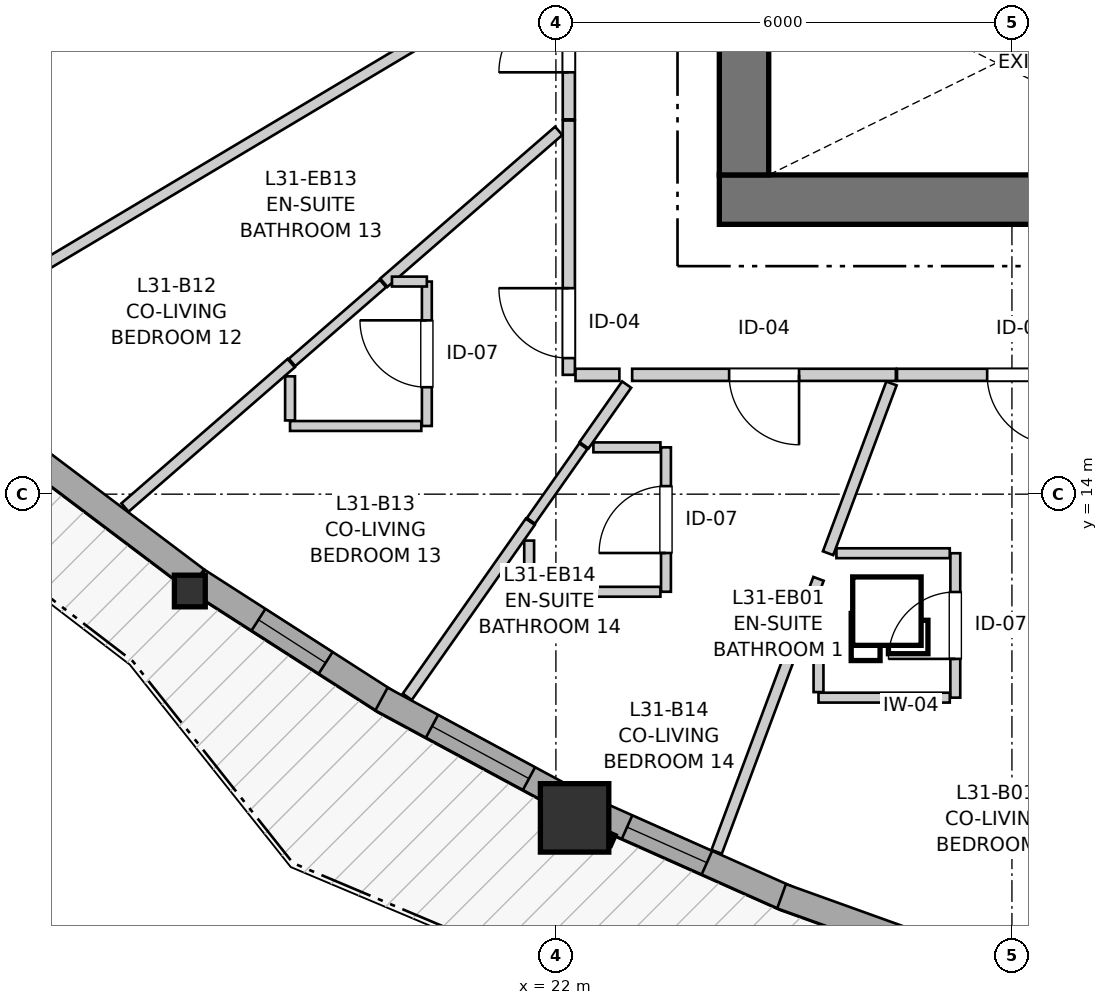
"""IFC4 building model, lengths in metres.
Left out: names, types, materials, properties, quantities, classifications, styles, units other than length and angle.
Written with IfcOpenShell. Run it as: python <this file> out.ifc"""

import sys

from ifc_helpers import new_model, si_unit, direction, frame, frame_2d, origin, origin_2d, place, context, subcontext, project, spatial, rectangle, i_section, extrude, source, transform, mapped, element, fill, save


model = new_model("IFC4")
c1 = context("Model", 3, precision=1e-05, world=origin(), true_north=direction((0.0, 1.0)))
c2 = subcontext(c1, "Body", "Model", "MODEL_VIEW")
j1 = project(units=[si_unit("LENGTHUNIT", "METRE"), si_unit("PLANEANGLEUNIT", "RADIAN")], contexts=[c1])
p1 = place(None, origin())
s1 = spatial("IfcSite", under=j1, at=p1, CompositionType="ELEMENT")
p2 = place(p1, origin())
s2 = spatial("IfcBuilding", under=s1, at=p2, CompositionType="ELEMENT")
p3 = place(p2, frame((0.0, 0.0, 105.6)))
s3 = spatial("IfcBuildingStorey", under=s2, at=p3, CompositionType="ELEMENT", Elevation=105.6)
p4 = place(p3, frame((24.15, 17.875, 0.0), z_axis=(0.0, 0.0, 1.0), x_axis=(1.0, 0.0, 0.0)))
e1 = element("IfcWall", 1, at=p4, inside=s3, PredefinedType="SHEAR", context=c2, shape_type="SweptSolid", body=[
    extrude(rectangle(XDim=12.4, YDim=0.65, at=frame_2d((6.2, 0.0))), origin(), (0.0, 0.0, 1.0), 2.935),
])
p5 = place(p3, frame((24.475, 33.8, 0.0), z_axis=(0.0, 0.0, 1.0), x_axis=(0.0, -1.0, 0.0)))
e2 = element("IfcWall", 2, at=p5, inside=s3, PredefinedType="SHEAR", context=c2, shape_type="SweptSolid", body=[
    extrude(rectangle(XDim=15.6, YDim=0.65, at=frame_2d((7.8, 0.0))), origin(), (0.0, 0.0, 1.0), 2.935),
])
p6 = place(p5, frame((7.05, 0.0, 0.0)))
e3 = element("IfcOpeningElement", 3, at=p6, cuts=e2, PredefinedType="OPENING", context=c2, shape_type="SweptSolid", body=[
    extrude(rectangle(XDim=1.5, YDim=2.15, at=frame_2d((0.75, 1.075))), frame((0.0, 0.335, 0.0), z_axis=(0.0, -1.0, 0.0), x_axis=(1.0, 0.0, 0.0)), (0.0, 0.0, 1.0), 0.67),
])
p7 = place(p5, frame((3.52, 0.0, 0.0)))
e4 = element("IfcOpeningElement", 4, at=p7, cuts=e2, PredefinedType="OPENING", context=c2, shape_type="SweptSolid", body=[
    extrude(rectangle(XDim=0.86, YDim=2.05, at=frame_2d((0.43, 1.025))), frame((0.0, 0.335, 0.0), z_axis=(0.0, -1.0, 0.0), x_axis=(1.0, 0.0, 0.0)), (0.0, 0.0, 1.0), 0.67),
])
p8 = place(p5, frame((11.22, 0.0, 0.0)))
e5 = element("IfcOpeningElement", 5, at=p8, cuts=e2, PredefinedType="OPENING", context=c2, shape_type="SweptSolid", body=[
    extrude(rectangle(XDim=0.86, YDim=2.05, at=frame_2d((0.43, 1.025))), frame((0.0, 0.335, 0.0), z_axis=(0.0, -1.0, 0.0), x_axis=(1.0, 0.0, 0.0)), (0.0, 0.0, 1.0), 0.67),
])
m1 = source(origin(), c2, "Body", "SweptSolid", [
    extrude(i_section(OverallWidth=0.406, OverallDepth=0.416, WebThickness=0.027, FlangeThickness=0.044, FilletRadius=0.015, at=origin_2d()), origin(), (0.0, 0.0, 1.0), 2.935),
])
p9 = place(p3, frame((17.184, 12.726, 0.0), z_axis=(0.0, 0.0, 1.0), x_axis=(1.0, 0.0, 0.0)))
e6 = element("IfcColumn", 6, at=p9, inside=s3, PredefinedType="PILASTER", context=c2, shape_type="MappedRepresentation", body=[
    mapped(m1, transform((0.0, 0.0, 0.0), x_axis=(1.0, 0.0, 0.0), y_axis=(0.0, 1.0, 0.0), z_axis=(0.0, 0.0, 1.0), scale=1.0)),
])
m2 = source(origin(), c2, "Body", "SweptSolid", [
    extrude(rectangle(XDim=0.9, YDim=0.9, at=origin_2d()), origin(), (0.0, 0.0, 1.0), 2.935),
])
p10 = place(p3, frame((22.246, 9.741, 0.0), z_axis=(0.0, 0.0, 1.0), x_axis=(1.0, 0.0, 0.0)))
e7 = element("IfcColumn", 7, at=p10, inside=s3, PredefinedType="COLUMN", context=c2, shape_type="MappedRepresentation", body=[
    mapped(m2, transform((0.0, 0.0, 0.0), x_axis=(1.0, 0.0, 0.0), y_axis=(0.0, 1.0, 0.0), z_axis=(0.0, 0.0, 1.0), scale=1.0)),
])
p11 = place(p3, frame((14.894, 14.665, 0.0), z_axis=(0.0, 0.0, 1.0), x_axis=(0.798431756537, -0.602085318001, 0.0)))
e8 = element("IfcWall", 8, at=p11, inside=s3, PredefinedType="SOLIDWALL", context=c2, shape_type="SweptSolid", body=[
    extrude(rectangle(XDim=2.976, YDim=0.34, at=frame_2d((1.488, 0.0))), origin(), (0.0, 0.0, 1.0), 2.465),
])
p12 = place(p3, frame((17.292, 12.858, 0.0), z_axis=(0.0, 0.0, 1.0), x_axis=(0.841524200167, -0.540219418878, 0.0)))
e9 = element("IfcWall", 9, at=p12, inside=s3, PredefinedType="SOLIDWALL", context=c2, shape_type="SweptSolid", body=[
    extrude(rectangle(XDim=2.958, YDim=0.34, at=frame_2d((1.479, 0.0))), origin(), (0.0, 0.0, 1.0), 2.465),
])
p13 = place(p12, frame((0.944, 0.0, 0.82)))
e10 = element("IfcOpeningElement", 10, at=p13, cuts=e9, PredefinedType="OPENING", context=c2, shape_type="SweptSolid", body=[
    extrude(rectangle(XDim=1.05, YDim=1.45, at=frame_2d((0.525, 0.725))), frame((0.0, 0.18, 0.0), z_axis=(0.0, -1.0, 0.0), x_axis=(1.0, 0.0, 0.0)), (0.0, 0.0, 1.0), 0.36),
])
p14 = place(p3, frame((19.705, 11.305, 0.0), z_axis=(0.0, 0.0, 1.0), x_axis=(0.880065774925, -0.474851799834, 0.0)))
e11 = element("IfcWall", 11, at=p14, inside=s3, PredefinedType="SOLIDWALL", context=c2, shape_type="SweptSolid", body=[
    extrude(rectangle(XDim=2.749, YDim=0.34, at=frame_2d((1.374, 0.0))), origin(), (0.0, 0.0, 1.0), 2.465),
])
p15 = place(p14, frame((0.755, 0.0, 0.82)))
e12 = element("IfcOpeningElement", 12, at=p15, cuts=e11, PredefinedType="OPENING", context=c2, shape_type="SweptSolid", body=[
    extrude(rectangle(XDim=1.45, YDim=1.25, at=frame_2d((0.725, 0.625))), frame((0.0, 0.18, 0.0), z_axis=(0.0, -1.0, 0.0), x_axis=(1.0, 0.0, 0.0)), (0.0, 0.0, 1.0), 0.36),
])
p16 = place(p3, frame((22.525, 9.803, 0.0), z_axis=(0.0, 0.0, 1.0), x_axis=(0.913407022137, -0.407047432016, 0.0)))
e13 = element("IfcWall", 13, at=p16, inside=s3, PredefinedType="SOLIDWALL", context=c2, shape_type="SweptSolid", body=[
    extrude(rectangle(XDim=2.766, YDim=0.34, at=frame_2d((1.383, 0.0))), origin(), (0.0, 0.0, 1.0), 2.465),
])
p17 = place(p16, frame((0.45, 0.0, 0.82)))
e14 = element("IfcOpeningElement", 14, at=p17, cuts=e13, PredefinedType="OPENING", context=c2, shape_type="SweptSolid", body=[
    extrude(rectangle(XDim=1.15, YDim=1.2, at=frame_2d((0.575, 0.6))), frame((0.0, 0.18, 0.0), z_axis=(0.0, -1.0, 0.0), x_axis=(1.0, 0.0, 0.0)), (0.0, 0.0, 1.0), 0.36),
])
p18 = place(p3, frame((24.969, 8.71, 0.0), z_axis=(0.0, 0.0, 1.0), x_axis=(0.94111062187, -0.338098798287, 0.0)))
e15 = element("IfcWall", 15, at=p18, inside=s3, PredefinedType="SOLIDWALL", context=c2, shape_type="SweptSolid", body=[
    extrude(rectangle(XDim=3.009, YDim=0.34, at=frame_2d((1.504, 0.0))), origin(), (0.0, 0.0, 1.0), 2.465),
])
p19 = place(p3, frame((26.473, 15.57, 0.0), z_axis=(0.0, 0.0, 1.0), x_axis=(-1.0, 0.0, 0.0)))
e16 = element("IfcWall", 16, at=p19, inside=s3, PredefinedType="PARTITIONING", context=c2, shape_type="SweptSolid", body=[
    extrude(rectangle(XDim=3.47, YDim=0.16, at=frame_2d((1.735, 0.0))), origin(), (0.0, 0.0, 1.0), 2.935),
])
p20 = place(p19, frame((1.274, 0.0, 0.0)))
e17 = element("IfcOpeningElement", 17, at=p20, cuts=e16, PredefinedType="OPENING", context=c2, shape_type="SweptSolid", body=[
    extrude(rectangle(XDim=0.92, YDim=2.1, at=frame_2d((0.46, 1.05))), frame((0.0, 0.09, 0.0), z_axis=(0.0, -1.0, 0.0), x_axis=(1.0, 0.0, 0.0)), (0.0, 0.0, 1.0), 0.18),
])
p21 = place(p3, frame((22.17, 15.57, 0.0), z_axis=(0.0, 0.0, 1.0), x_axis=(0.0, 1.0, 0.0)))
e18 = element("IfcWall", 18, at=p21, inside=s3, PredefinedType="PARTITIONING", context=c2, shape_type="SweptSolid", body=[
    extrude(rectangle(XDim=3.346, YDim=0.16, at=frame_2d((1.673, 0.0))), origin(), (0.0, 0.0, 1.0), 2.935),
])
p22 = place(p21, frame((0.22, 0.0, 0.0)))
e19 = element("IfcOpeningElement", 19, at=p22, cuts=e18, PredefinedType="OPENING", context=c2, shape_type="SweptSolid", body=[
    extrude(rectangle(XDim=0.92, YDim=2.1, at=frame_2d((0.46, 1.05))), frame((0.0, 0.09, 0.0), z_axis=(0.0, -1.0, 0.0), x_axis=(1.0, 0.0, 0.0)), (0.0, 0.0, 1.0), 0.18),
])
p23 = place(p3, frame((29.781, 15.57, 0.0), z_axis=(0.0, 0.0, 1.0), x_axis=(-1.0, 0.0, 0.0)))
e20 = element("IfcWall", 20, at=p23, inside=s3, PredefinedType="PARTITIONING", context=c2, shape_type="SweptSolid", body=[
    extrude(rectangle(XDim=3.293, YDim=0.16, at=frame_2d((1.646, 0.0))), origin(), (0.0, 0.0, 1.0), 2.935),
])
p24 = place(p23, frame((1.187, 0.0, 0.0)))
e21 = element("IfcOpeningElement", 21, at=p24, cuts=e20, PredefinedType="OPENING", context=c2, shape_type="SweptSolid", body=[
    extrude(rectangle(XDim=0.92, YDim=2.1, at=frame_2d((0.46, 1.05))), frame((0.0, 0.09, 0.0), z_axis=(0.0, -1.0, 0.0), x_axis=(1.0, 0.0, 0.0)), (0.0, 0.0, 1.0), 0.18),
])
p25 = place(p3, frame((22.17, 18.931, 0.0), z_axis=(0.0, 0.0, 1.0), x_axis=(0.0, 1.0, 0.0)))
e22 = element("IfcWall", 22, at=p25, inside=s3, PredefinedType="PARTITIONING", context=c2, shape_type="SweptSolid", body=[
    extrude(rectangle(XDim=2.21, YDim=0.16, at=frame_2d((1.105, 0.0))), origin(), (0.0, 0.0, 1.0), 2.935),
])
p26 = place(p25, frame((0.619, 0.0, 0.0)))
e23 = element("IfcOpeningElement", 23, at=p26, cuts=e22, PredefinedType="OPENING", context=c2, shape_type="SweptSolid", body=[
    extrude(rectangle(XDim=0.92, YDim=2.1, at=frame_2d((0.46, 1.05))), frame((0.0, 0.09, 0.0), z_axis=(0.0, -1.0, 0.0), x_axis=(1.0, 0.0, 0.0)), (0.0, 0.0, 1.0), 0.18),
])
p27 = place(p3, frame((27.255, 11.323, 0.0), z_axis=(0.0, 0.0, 1.0), x_axis=(0.0, 1.0, 0.0)))
e24 = element("IfcWall", 24, at=p27, inside=s3, PredefinedType="PARTITIONING", context=c2, shape_type="SweptSolid", body=[
    extrude(rectangle(XDim=1.9, YDim=0.13, at=frame_2d((0.95, 0.0))), origin(), (0.0, 0.0, 1.0), 2.103),
])
p28 = place(p27, frame((0.51, 0.0, 0.0)))
e25 = element("IfcOpeningElement", 25, at=p28, cuts=e24, PredefinedType="OPENING", context=c2, shape_type="SweptSolid", body=[
    extrude(rectangle(XDim=0.88, YDim=2.05, at=frame_2d((0.44, 1.025))), frame((0.0, 0.075, 0.0), z_axis=(0.0, -1.0, 0.0), x_axis=(1.0, 0.0, 0.0)), (0.0, 0.0, 1.0), 0.15),
])
p29 = place(p3, frame((20.302, 14.897, 0.0), z_axis=(0.0, 0.0, 1.0), x_axis=(0.0, 1.0, 0.0)))
e26 = element("IfcWall", 26, at=p29, inside=s3, PredefinedType="PARTITIONING", context=c2, shape_type="SweptSolid", body=[
    extrude(rectangle(XDim=1.9, YDim=0.13, at=frame_2d((0.95, 0.0))), origin(), (0.0, 0.0, 1.0), 2.935),
])
p30 = place(p29, frame((0.51, 0.0, 0.0)))
e27 = element("IfcOpeningElement", 27, at=p30, cuts=e26, PredefinedType="OPENING", context=c2, shape_type="SweptSolid", body=[
    extrude(rectangle(XDim=0.88, YDim=2.05, at=frame_2d((0.44, 1.025))), frame((0.0, 0.075, 0.0), z_axis=(0.0, -1.0, 0.0), x_axis=(1.0, 0.0, 0.0)), (0.0, 0.0, 1.0), 0.15),
])
p31 = place(p3, frame((23.448, 12.716, 0.0), z_axis=(0.0, 0.0, 1.0), x_axis=(0.0, 1.0, 0.0)))
e28 = element("IfcWall", 28, at=p31, inside=s3, PredefinedType="PARTITIONING", context=c2, shape_type="SweptSolid", body=[
    extrude(rectangle(XDim=1.9, YDim=0.13, at=frame_2d((0.95, 0.0))), origin(), (0.0, 0.0, 1.0), 2.103),
])
p32 = place(p31, frame((0.51, 0.0, 0.0)))
e29 = element("IfcOpeningElement", 29, at=p32, cuts=e28, PredefinedType="OPENING", context=c2, shape_type="SweptSolid", body=[
    extrude(rectangle(XDim=0.88, YDim=2.05, at=frame_2d((0.44, 1.025))), frame((0.0, 0.075, 0.0), z_axis=(0.0, -1.0, 0.0), x_axis=(1.0, 0.0, 0.0)), (0.0, 0.0, 1.0), 0.15),
])
p33 = place(p3, frame((11.28, 18.294, 0.0), z_axis=(0.0, 0.0, 1.0), x_axis=(0.927137862507, 0.374720407645, 0.0)))
e30 = element("IfcWall", 30, at=p33, inside=s3, PredefinedType="PARTITIONING", context=c2, shape_type="SweptSolid", body=[
    extrude(rectangle(XDim=11.622, YDim=0.145, at=frame_2d((5.811, 0.0))), origin(), (0.0, 0.0, 1.0), 2.935),
])
p34 = place(p3, frame((13.622, 16.028, 0.0), z_axis=(0.0, 0.0, 1.0), x_axis=(0.85896108151, 0.512040877716, 0.0)))
e31 = element("IfcWall", 31, at=p34, inside=s3, PredefinedType="PARTITIONING", context=c2, shape_type="SweptSolid", body=[
    extrude(rectangle(XDim=9.807, YDim=0.145, at=frame_2d((4.904, 0.0))), origin(), (0.0, 0.0, 1.0), 2.935),
])
p35 = place(p3, frame((24.115, 9.294, 0.0), z_axis=(0.0, 0.0, 1.0), x_axis=(0.349559649022, 0.936914111205, 0.0)))
e32 = element("IfcWall", 32, at=p35, inside=s3, PredefinedType="PARTITIONING", context=c2, shape_type="SweptSolid", body=[
    extrude(rectangle(XDim=3.834, YDim=0.145, at=frame_2d((1.917, 0.0))), origin(), (0.0, 0.0, 1.0), 2.935),
])
p36 = place(p3, frame((19.736, 16.782, 0.0), z_axis=(0.0, 0.0, 1.0), x_axis=(0.754964216329, 0.655765988796, 0.0)))
e33 = element("IfcWall", 33, at=p36, inside=s3, PredefinedType="PARTITIONING", context=c2, shape_type="SweptSolid", body=[
    extrude(rectangle(XDim=3.047, YDim=0.145, at=frame_2d((1.523, 0.0))), origin(), (0.0, 0.0, 1.0), 2.935),
])
p37 = place(p3, frame((16.33, 13.824, 0.0), z_axis=(0.0, 0.0, 1.0), x_axis=(0.754843145593, 0.655905348013, 0.0)))
e34 = element("IfcWall", 34, at=p37, inside=s3, PredefinedType="PARTITIONING", context=c2, shape_type="SweptSolid", body=[
    extrude(rectangle(XDim=2.897, YDim=0.145, at=frame_2d((1.448, 0.0))), origin(), (0.0, 0.0, 1.0), 2.935),
])
p38 = place(p3, frame((20.044, 11.334, 0.0), z_axis=(0.0, 0.0, 1.0), x_axis=(0.575027113175, 0.818134352728, 0.0)))
e35 = element("IfcWall", 35, at=p38, inside=s3, PredefinedType="PARTITIONING", context=c2, shape_type="SweptSolid", body=[
    extrude(rectangle(XDim=2.815, YDim=0.145, at=frame_2d((1.407, 0.0))), origin(), (0.0, 0.0, 1.0), 2.935),
])
p39 = place(p3, frame((25.581, 13.223, 0.0), z_axis=(0.0, 0.0, 1.0), x_axis=(0.349597225683, 0.936900090615, 0.0)))
e36 = element("IfcWall", 36, at=p39, inside=s3, PredefinedType="PARTITIONING", context=c2, shape_type="SweptSolid", body=[
    extrude(rectangle(XDim=2.385, YDim=0.145, at=frame_2d((1.192, 0.0))), origin(), (0.0, 0.0, 1.0), 2.935),
])
p40 = place(p3, frame((25.455, 11.323, 0.0), z_axis=(0.0, 0.0, 1.0), x_axis=(1.0, 0.0, 0.0)))
e37 = element("IfcWall", 37, at=p40, inside=s3, PredefinedType="PARTITIONING", context=c2, shape_type="SweptSolid", body=[
    extrude(rectangle(XDim=1.727, YDim=0.13, at=frame_2d((0.863, 0.0))), origin(), (0.0, 0.0, 1.0), 2.543),
])
for number, where, z_axis, x_axis in (
    (38, (18.502, 14.897, 0.0), (0.0, 0.0, 1.0), (1.0, 0.0, 0.0)),
    (39, (21.648, 12.716, 0.0), (0.0, 0.0, 1.0), (1.0, 0.0, 0.0)),
):
    element("IfcWall", number, at=place(p3, frame(where, z_axis=z_axis, x_axis=x_axis)), inside=s3, PredefinedType="PARTITIONING", context=c2, shape_type="SweptSolid", body=[
        extrude(rectangle(XDim=1.727, YDim=0.13, at=frame_2d((0.864, 0.0))), origin(), (0.0, 0.0, 1.0), 2.935),
    ])
p41 = place(p3, frame((25.691, 13.223, 0.0), z_axis=(0.0, 0.0, 1.0), x_axis=(1.0, 0.0, 0.0)))
e40 = element("IfcWall", 40, at=p41, inside=s3, PredefinedType="PARTITIONING", context=c2, shape_type="SweptSolid", body=[
    extrude(rectangle(XDim=1.491, YDim=0.13, at=frame_2d((0.746, 0.0))), origin(), (0.0, 0.0, 1.0), 2.935),
])
p42 = place(p3, frame((18.528, 15.734, 0.0), z_axis=(0.0, 0.0, 1.0), x_axis=(0.755063236967, 0.655651971843, 0.0)))
e41 = element("IfcWall", 41, at=p42, inside=s3, PredefinedType="PARTITIONING", context=c2, shape_type="SweptSolid", body=[
    extrude(rectangle(XDim=1.584, YDim=0.13, at=frame_2d((0.792, 0.0))), origin(), (0.0, 0.0, 1.0), 2.935),
])
p43 = place(p3, frame((25.455, 11.396, 0.0), z_axis=(0.0, 0.0, 1.0), x_axis=(0.0, 1.0, 0.0)))
e42 = element("IfcWall", 42, at=p43, inside=s3, PredefinedType="PARTITIONING", context=c2, shape_type="SweptSolid", body=[
    extrude(rectangle(XDim=1.25, YDim=0.13, at=frame_2d((0.625, 0.0))), origin(), (0.0, 0.0, 1.0), 2.935),
])
p44 = place(p3, frame((21.671, 13.649, 0.0), z_axis=(0.0, 0.0, 1.0), x_axis=(0.574868196693, 0.81824602439, 0.0)))
e43 = element("IfcWall", 43, at=p44, inside=s3, PredefinedType="PARTITIONING", context=c2, shape_type="SweptSolid", body=[
    extrude(rectangle(XDim=1.2, YDim=0.13, at=frame_2d((0.6, 0.0))), origin(), (0.0, 0.0, 1.0), 2.935),
])
p45 = place(p3, frame((22.37, 14.643, 0.0), z_axis=(0.0, 0.0, 1.0), x_axis=(0.575022445487, 0.818137633401, 0.0)))
e44 = element("IfcWall", 44, at=p45, inside=s3, PredefinedType="PARTITIONING", context=c2, shape_type="SweptSolid", body=[
    extrude(rectangle(XDim=0.976, YDim=0.145, at=frame_2d((0.488, 0.0))), origin(), (0.0, 0.0, 1.0), 2.935),
])
p46 = place(p3, frame((22.493, 14.616, 0.0), z_axis=(0.0, 0.0, 1.0), x_axis=(1.0, 0.0, 0.0)))
e45 = element("IfcWall", 45, at=p46, inside=s3, PredefinedType="PARTITIONING", context=c2, shape_type="SweptSolid", body=[
    extrude(rectangle(XDim=0.882, YDim=0.13, at=frame_2d((0.441, 0.0))), origin(), (0.0, 0.0, 1.0), 2.935),
])
p47 = place(p3, frame((21.648, 12.789, 0.0), z_axis=(0.0, 0.0, 1.0), x_axis=(0.0, 1.0, 0.0)))
e46 = element("IfcWall", 46, at=p47, inside=s3, PredefinedType="PARTITIONING", context=c2, shape_type="SweptSolid", body=[
    extrude(rectangle(XDim=0.6, YDim=0.13, at=frame_2d((0.3, 0.0))), origin(), (0.0, 0.0, 1.0), 2.935),
])
p48 = place(p3, frame((22.258, 15.57, 0.0), z_axis=(0.0, 0.0, 1.0), x_axis=(1.0, 0.0, 0.0)))
e47 = element("IfcWall", 47, at=p48, inside=s3, PredefinedType="PARTITIONING", context=c2, shape_type="SweptSolid", body=[
    extrude(rectangle(XDim=0.577, YDim=0.16, at=frame_2d((0.289, 0.0))), origin(), (0.0, 0.0, 1.0), 2.935),
])
p49 = place(p3, frame((18.502, 14.97, 0.0), z_axis=(0.0, 0.0, 1.0), x_axis=(0.0, 1.0, 0.0)))
e48 = element("IfcWall", 48, at=p49, inside=s3, PredefinedType="PARTITIONING", context=c2, shape_type="SweptSolid", body=[
    extrude(rectangle(XDim=0.581, YDim=0.13, at=frame_2d((0.29, 0.0))), origin(), (0.0, 0.0, 1.0), 2.935),
])
p50 = place(p3, frame((19.843, 16.797, 0.0), z_axis=(0.0, 0.0, 1.0), x_axis=(1.0, 0.0, 0.0)))
e49 = element("IfcWall", 49, at=p50, inside=s3, PredefinedType="PARTITIONING", context=c2, shape_type="SweptSolid", body=[
    extrude(rectangle(XDim=0.459, YDim=0.13, at=frame_2d((0.229, 0.0))), origin(), (0.0, 0.0, 1.0), 2.935),
])
m3 = source(origin(), c2, "Body", "SweptSolid", [
    extrude(rectangle(XDim=1.05, YDim=1.45, at=frame_2d((0.525, 0.725))), frame((0.0, 0.03, 0.0), z_axis=(0.0, -1.0, 0.0), x_axis=(1.0, 0.0, 0.0)), (0.0, 0.0, 1.0), 0.06),
])
p51 = place(p13, origin())
e50 = element("IfcWindow", 50, at=p51, inside=s3, PartitioningType="SINGLE_PANEL", PredefinedType="WINDOW", context=c2, shape_type="MappedRepresentation", body=[
    mapped(m3, transform((0.0, 0.0, 0.0), x_axis=(1.0, 0.0, 0.0), y_axis=(0.0, 1.0, 0.0), z_axis=(0.0, 0.0, 1.0), scale=1.0)),
])
fill(e10, e50)
m4 = source(origin(), c2, "Body", "SweptSolid", [
    extrude(rectangle(XDim=1.45, YDim=1.25, at=frame_2d((0.725, 0.625))), frame((0.0, 0.03, 0.0), z_axis=(0.0, -1.0, 0.0), x_axis=(1.0, 0.0, 0.0)), (0.0, 0.0, 1.0), 0.06),
])
p52 = place(p15, origin())
e51 = element("IfcWindow", 51, at=p52, inside=s3, PartitioningType="SINGLE_PANEL", PredefinedType="WINDOW", context=c2, shape_type="MappedRepresentation", body=[
    mapped(m4, transform((0.0, 0.0, 0.0), x_axis=(1.0, 0.0, 0.0), y_axis=(0.0, 1.0, 0.0), z_axis=(0.0, 0.0, 1.0), scale=1.0)),
])
fill(e12, e51)
m5 = source(origin(), c2, "Body", "SweptSolid", [
    extrude(rectangle(XDim=1.15, YDim=1.2, at=frame_2d((0.575, 0.6))), frame((0.0, 0.03, 0.0), z_axis=(0.0, -1.0, 0.0), x_axis=(1.0, 0.0, 0.0)), (0.0, 0.0, 1.0), 0.06),
])
p53 = place(p17, origin())
e52 = element("IfcWindow", 52, at=p53, inside=s3, PartitioningType="SINGLE_PANEL", PredefinedType="WINDOW", context=c2, shape_type="MappedRepresentation", body=[
    mapped(m5, transform((0.0, 0.0, 0.0), x_axis=(1.0, 0.0, 0.0), y_axis=(0.0, 1.0, 0.0), z_axis=(0.0, 0.0, 1.0), scale=1.0)),
])
fill(e14, e52)
m6 = source(origin(), c2, "Body", "SweptSolid", [
    extrude(rectangle(XDim=0.92, YDim=2.1, at=frame_2d((0.46, 1.05))), frame((0.0, 0.025, 0.0), z_axis=(0.0, -1.0, 0.0), x_axis=(1.0, 0.0, 0.0)), (0.0, 0.0, 1.0), 0.05),
])
p54 = place(p20, origin())
e53 = element("IfcDoor", 53, at=p54, inside=s3, OperationType="SINGLE_SWING_LEFT", PredefinedType="DOOR", context=c2, shape_type="MappedRepresentation", body=[
    mapped(m6, transform((0.0, 0.0, 0.0), x_axis=(1.0, 0.0, 0.0), y_axis=(0.0, 1.0, 0.0), z_axis=(0.0, 0.0, 1.0), scale=1.0)),
])
fill(e17, e53)
p55 = place(p22, origin())
e54 = element("IfcDoor", 54, at=p55, inside=s3, OperationType="SINGLE_SWING_RIGHT", PredefinedType="DOOR", context=c2, shape_type="MappedRepresentation", body=[
    mapped(m6, transform((0.0, 0.0, 0.0), x_axis=(1.0, 0.0, 0.0), y_axis=(0.0, 1.0, 0.0), z_axis=(0.0, 0.0, 1.0), scale=1.0)),
])
fill(e19, e54)
p56 = place(p24, origin())
e55 = element("IfcDoor", 55, at=p56, inside=s3, OperationType="SINGLE_SWING_LEFT", PredefinedType="DOOR", context=c2, shape_type="MappedRepresentation", body=[
    mapped(m6, transform((0.0, 0.0, 0.0), x_axis=(1.0, 0.0, 0.0), y_axis=(0.0, 1.0, 0.0), z_axis=(0.0, 0.0, 1.0), scale=1.0)),
])
fill(e21, e55)
p57 = place(p26, origin())
e56 = element("IfcDoor", 56, at=p57, inside=s3, OperationType="SINGLE_SWING_LEFT", PredefinedType="DOOR", context=c2, shape_type="MappedRepresentation", body=[
    mapped(m6, transform((0.0, 0.0, 0.0), x_axis=(1.0, 0.0, 0.0), y_axis=(0.0, 1.0, 0.0), z_axis=(0.0, 0.0, 1.0), scale=1.0)),
])
fill(e23, e56)
m7 = source(origin(), c2, "Body", "SweptSolid", [
    extrude(rectangle(XDim=0.88, YDim=2.05, at=frame_2d((0.44, 1.025))), frame((0.0, 0.025, 0.0), z_axis=(0.0, -1.0, 0.0), x_axis=(1.0, 0.0, 0.0)), (0.0, 0.0, 1.0), 0.05),
])
p58 = place(p28, origin())
e57 = element("IfcDoor", 57, at=p58, inside=s3, OperationType="SINGLE_SWING_LEFT", PredefinedType="DOOR", context=c2, shape_type="MappedRepresentation", body=[
    mapped(m7, transform((0.0, 0.0, 0.0), x_axis=(1.0, 0.0, 0.0), y_axis=(0.0, 1.0, 0.0), z_axis=(0.0, 0.0, 1.0), scale=1.0)),
])
fill(e25, e57)
p59 = place(p30, origin())
e58 = element("IfcDoor", 58, at=p59, inside=s3, OperationType="SINGLE_SWING_RIGHT", PredefinedType="DOOR", context=c2, shape_type="MappedRepresentation", body=[
    mapped(m7, transform((0.0, 0.0, 0.0), x_axis=(1.0, 0.0, 0.0), y_axis=(0.0, 1.0, 0.0), z_axis=(0.0, 0.0, 1.0), scale=1.0)),
])
fill(e27, e58)
p60 = place(p32, origin())
e59 = element("IfcDoor", 59, at=p60, inside=s3, OperationType="SINGLE_SWING_LEFT", PredefinedType="DOOR", context=c2, shape_type="MappedRepresentation", body=[
    mapped(m7, transform((0.0, 0.0, 0.0), x_axis=(1.0, 0.0, 0.0), y_axis=(0.0, 1.0, 0.0), z_axis=(0.0, 0.0, 1.0), scale=1.0)),
])
fill(e29, e59)
save(model, sys.argv[1])
